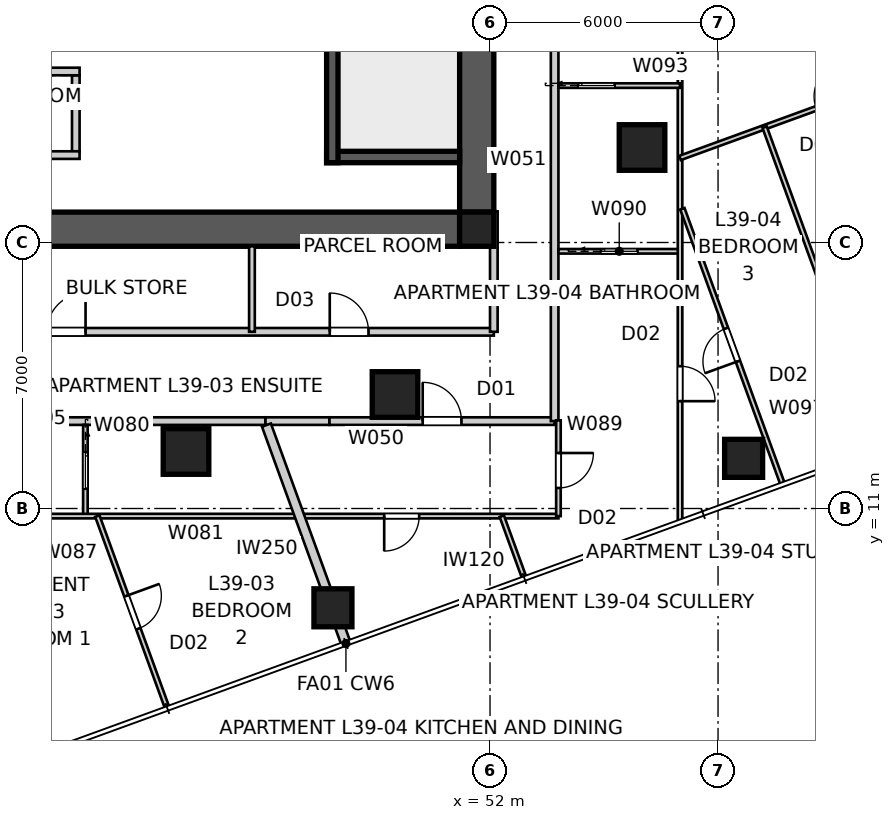
"""IFC4 building model, lengths in metres.
Left out: names, types, materials, properties, quantities, classifications, styles, units other than length and angle.
Written with IfcOpenShell. Run it as: python <this file> out.ifc"""

import sys

from ifc_helpers import new_model, si_unit, direction, frame, frame_2d, origin, origin_2d, place, context, subcontext, project, spatial, polyline, rectangle, outline, extrude, element, fill, save


model = new_model("IFC4")
c1 = context("Model", 3, precision=1e-05, world=origin(), true_north=direction((0.0, 1.0)))
c2 = subcontext(c1, "Body", "Model", "MODEL_VIEW")
j1 = project(units=[si_unit("LENGTHUNIT", "METRE"), si_unit("PLANEANGLEUNIT", "RADIAN")], contexts=[c1])
p1 = place(None, origin())
s1 = spatial("IfcSite", under=j1, at=p1, CompositionType="ELEMENT")
p2 = place(p1, origin())
s2 = spatial("IfcBuilding", under=s1, at=p2, CompositionType="ELEMENT")
p3 = place(p2, frame((0.0, 0.0, 143.8)))
s3 = spatial("IfcBuildingStorey", under=s2, at=p3, CompositionType="ELEMENT", Elevation=143.8)
p4 = place(p3, frame((51.2, 18.35, 0.0), z_axis=(0.0, 0.0, 1.0), x_axis=(-1.0, 0.0, 0.0)))
e1 = element("IfcWall", 1, at=p4, inside=s3, PredefinedType="SHEAR", context=c2, shape_type="SweptSolid", body=[
    extrude(outline(polyline([(0.0, -0.45), (22.4, -0.45), (22.4, -0.025), (22.85, -0.025), (22.85, 0.025), (22.4, 0.025), (22.4, 0.45), (0.0, 0.45), (0.0, 0.025), (-0.45, 0.025), (-0.45, -0.025), (0.0, -0.025), (0.0, -0.45)])), origin(), (0.0, 0.0, 1.0), 3.4),
])
p5 = place(p3, frame((51.65, 18.8, 0.0), z_axis=(0.0, 0.0, 1.0), x_axis=(0.0, 1.0, 0.0)))
e2 = element("IfcWall", 2, at=p5, inside=s3, PredefinedType="SHEAR", context=c2, shape_type="SweptSolid", body=[
    extrude(outline(polyline([(0.0, -0.45), (22.4, -0.45), (22.4, -0.025), (22.85, -0.025), (22.85, 0.025), (22.4, 0.025), (22.4, 0.45), (0.0, 0.45), (0.0, 0.025), (-0.45, 0.025), (-0.45, -0.025), (0.0, -0.025), (0.0, -0.45)])), origin(), (0.0, 0.0, 1.0), 3.4),
])
p6 = place(p5, frame((11.14, 0.0, 0.0)))
e3 = element("IfcOpeningElement", 3, at=p6, cuts=e2, PredefinedType="OPENING", context=c2, shape_type="SweptSolid", body=[
    extrude(rectangle(XDim=1.02, YDim=2.4, at=frame_2d((0.51, 1.2))), frame((0.0, 0.46, 0.0), z_axis=(0.0, -1.0, 0.0), x_axis=(1.0, 0.0, 0.0)), (0.0, 0.0, 1.0), 0.92),
])
p7 = place(p3, frame((47.85, 27.8, 0.0), z_axis=(0.0, 0.0, 1.0), x_axis=(0.0, -1.0, 0.0)))
e4 = element("IfcWall", 4, at=p7, inside=s3, PredefinedType="SHEAR", context=c2, shape_type="SweptSolid", body=[
    extrude(rectangle(XDim=7.7, YDim=0.3, at=frame_2d((3.85, 0.0))), origin(), (0.0, 0.0, 1.0), 3.4),
])
p8 = place(p3, frame((51.2, 20.25, 0.0), z_axis=(0.0, 0.0, 1.0), x_axis=(-1.0, 0.0, 0.0)))
e5 = element("IfcWall", 5, at=p8, inside=s3, PredefinedType="SHEAR", context=c2, shape_type="SweptSolid", body=[
    extrude(rectangle(XDim=3.5, YDim=0.3, at=frame_2d((1.75, 0.0))), origin(), (0.0, 0.0, 1.0), 3.4),
])
p9 = place(p3, frame((41.1, 22.4, 0.0), z_axis=(0.0, 0.0, 1.0), x_axis=(0.0, -1.0, 0.0)))
e6 = element("IfcWall", 6, at=p9, inside=s3, PredefinedType="SOLIDWALL", context=c2, shape_type="SweptSolid", body=[
    extrude(rectangle(XDim=2.0, YDim=0.2, at=frame_2d((1.0, 0.0))), origin(), (0.0, 0.0, 1.0), 3.4),
])
for number, where, z_axis, x_axis in (
    (7, (38.8, 22.5, 0.0), (0.0, 0.0, 1.0), (1.0, 0.0, 0.0)),
    (8, (38.8, 20.3, 0.0), (0.0, 0.0, 1.0), (1.0, 0.0, 0.0)),
):
    element("IfcWall", number, at=place(p3, frame(where, z_axis=z_axis, x_axis=x_axis)), inside=s3, PredefinedType="SOLIDWALL", context=c2, shape_type="SweptSolid", body=[
        extrude(rectangle(XDim=2.4, YDim=0.2, at=frame_2d((1.2, 0.0))), origin(), (0.0, 0.0, 1.0), 3.4),
    ])
p10 = place(p3, frame((51.65, 18.35, 0.0), z_axis=(0.0, 0.0, 1.0), x_axis=(1.0, 0.0, 0.0)))
e9 = element("IfcColumn", 9, at=p10, inside=s3, PredefinedType="COLUMN", context=c2, shape_type="SweptSolid", body=[
    extrude(rectangle(XDim=0.9, YDim=0.9, at=origin_2d()), origin(), (0.0, 0.0, 1.0), 3.4),
])
for number, where, z_axis, x_axis in (
    (10, (47.866, 8.387, -0.15), (0.0, 0.0, 1.0), (1.0, 0.0, 0.0)),
    (11, (58.673, 12.32, -0.15), (0.0, 0.0, 1.0), (1.0, 0.0, 0.0)),
):
    element("IfcColumn", number, at=place(p3, frame(where, z_axis=z_axis, x_axis=x_axis)), inside=s3, PredefinedType="COLUMN", context=c2, shape_type="SweptSolid", body=[
        extrude(rectangle(XDim=1.0, YDim=1.0, at=origin_2d()), origin(), (0.0, 0.0, 1.0), 3.55),
    ])
for number, where, z_axis, x_axis in (
    (12, (44.0, 12.5, 0.0), (0.0, 0.0, 1.0), (1.0, 0.0, 0.0)),
    (13, (49.5, 14.0, 0.0), (0.0, 0.0, 1.0), (1.0, 0.0, 0.0)),
    (14, (56.0, 20.5, 0.0), (0.0, 0.0, 1.0), (1.0, 0.0, 0.0)),
):
    element("IfcColumn", number, at=place(p3, frame(where, z_axis=z_axis, x_axis=x_axis)), inside=s3, PredefinedType="COLUMN", context=c2, shape_type="SweptSolid", body=[
        extrude(rectangle(XDim=1.2, YDim=1.2, at=origin_2d()), origin(), (0.0, 0.0, 1.0), 3.4),
    ])
p11 = place(p3, frame((33.908, 13.3, 0.0), z_axis=(0.0, 0.0, 1.0), x_axis=(1.0, 0.0, 0.0)))
e15 = element("IfcWall", 15, at=p11, inside=s3, PredefinedType="PARTITIONING", context=c2, shape_type="SweptSolid", body=[
    extrude(rectangle(XDim=12.183, YDim=0.2, at=frame_2d((6.092, 0.0))), origin(), (0.0, 0.0, 1.0), 3.25),
])
p12 = place(p3, frame((46.092, 13.3, 0.0), z_axis=(0.0, 0.0, 1.0), x_axis=(1.0, 0.0, 0.0)))
e16 = element("IfcWall", 16, at=p12, inside=s3, PredefinedType="PARTITIONING", context=c2, shape_type="SweptSolid", body=[
    extrude(rectangle(XDim=1.684, YDim=0.2, at=frame_2d((0.842, 0.0))), origin(), (0.0, 0.0, 1.0), 2.55),
])
p13 = place(p3, frame((47.775, 13.3, 0.0), z_axis=(0.0, 0.0, 1.0), x_axis=(1.0, 0.0, 0.0)))
e17 = element("IfcWall", 17, at=p13, inside=s3, PredefinedType="PARTITIONING", context=c2, shape_type="SweptSolid", body=[
    extrude(rectangle(XDim=5.925, YDim=0.2, at=frame_2d((2.962, 0.0))), origin(), (0.0, 0.0, 1.0), 3.25),
])
p14 = place(p13, frame((2.453, 0.0, 0.0)))
e18 = element("IfcOpeningElement", 18, at=p14, cuts=e17, PredefinedType="OPENING", context=c2, shape_type="SweptSolid", body=[
    extrude(rectangle(XDim=1.02, YDim=2.34, at=frame_2d((0.51, 1.17))), frame((0.0, 0.11, 0.0), z_axis=(0.0, -1.0, 0.0), x_axis=(1.0, 0.0, 0.0)), (0.0, 0.0, 1.0), 0.22),
])
p15 = place(p3, frame((53.7, 13.3, 0.0), z_axis=(0.0, 0.0, 1.0), x_axis=(0.0, 1.0, 0.0)))
e19 = element("IfcWall", 19, at=p15, inside=s3, PredefinedType="PARTITIONING", context=c2, shape_type="SweptSolid", body=[
    extrude(rectangle(XDim=33.0, YDim=0.2, at=frame_2d((16.5, 0.0))), origin(), (0.0, 0.0, 1.0), 3.25),
])
p16 = place(p15, frame((28.411, 0.0, 0.0)))
e20 = element("IfcOpeningElement", 20, at=p16, cuts=e19, PredefinedType="OPENING", context=c2, shape_type="SweptSolid", body=[
    extrude(rectangle(XDim=1.02, YDim=2.1, at=frame_2d((0.51, 1.05))), frame((0.0, 0.11, 0.0), z_axis=(0.0, -1.0, 0.0), x_axis=(1.0, 0.0, 0.0)), (0.0, 0.0, 1.0), 0.22),
])
p17 = place(p15, frame((13.741, 0.0, 0.0)))
e21 = element("IfcOpeningElement", 21, at=p17, cuts=e19, PredefinedType="OPENING", context=c2, shape_type="SweptSolid", body=[
    extrude(rectangle(XDim=1.02, YDim=2.34, at=frame_2d((0.51, 1.17))), frame((0.0, 0.11, 0.0), z_axis=(0.0, -1.0, 0.0), x_axis=(1.0, 0.0, 0.0)), (0.0, 0.0, 1.0), 0.22),
])
p18 = place(p3, frame((48.208, 7.447, 0.0), z_axis=(0.0, 0.0, 1.0), x_axis=(-0.341999444481, 0.939700154291, 0.0)))
e22 = element("IfcWall", 22, at=p18, inside=s3, PredefinedType="PARTITIONING", context=c2, shape_type="SweptSolid", body=[
    extrude(rectangle(XDim=6.116, YDim=0.25, at=frame_2d((3.058, 0.0))), origin(), (0.0, 0.0, 1.0), 3.25),
])
p19 = place(p3, frame((27.9, 15.65, 0.0), z_axis=(0.0, 0.0, 1.0), x_axis=(1.0, 0.0, 0.0)))
e23 = element("IfcWall", 23, at=p19, inside=s3, PredefinedType="PARTITIONING", context=c2, shape_type="SweptSolid", body=[
    extrude(rectangle(XDim=24.2, YDim=0.2, at=frame_2d((12.1, 0.0))), origin(), (0.0, 0.0, 1.0), 3.25),
])
p20 = place(p19, frame((12.437, 0.0, 0.0)))
e24 = element("IfcOpeningElement", 24, at=p20, cuts=e23, PredefinedType="OPENING", context=c2, shape_type="SweptSolid", body=[
    extrude(rectangle(XDim=1.02, YDim=2.1, at=frame_2d((0.51, 1.05))), frame((0.0, 0.11, 0.0), z_axis=(0.0, -1.0, 0.0), x_axis=(1.0, 0.0, 0.0)), (0.0, 0.0, 1.0), 0.22),
])
p21 = place(p19, frame((3.544, 0.0, 0.0)))
e25 = element("IfcOpeningElement", 25, at=p21, cuts=e23, PredefinedType="OPENING", context=c2, shape_type="SweptSolid", body=[
    extrude(rectangle(XDim=1.02, YDim=2.1, at=frame_2d((0.51, 1.05))), frame((0.0, 0.11, 0.0), z_axis=(0.0, -1.0, 0.0), x_axis=(1.0, 0.0, 0.0)), (0.0, 0.0, 1.0), 0.22),
])
p22 = place(p19, frame((19.883, 0.0, 0.0)))
e26 = element("IfcOpeningElement", 26, at=p22, cuts=e23, PredefinedType="OPENING", context=c2, shape_type="SweptSolid", body=[
    extrude(rectangle(XDim=1.02, YDim=2.1, at=frame_2d((0.51, 1.05))), frame((0.0, 0.11, 0.0), z_axis=(0.0, -1.0, 0.0), x_axis=(1.0, 0.0, 0.0)), (0.0, 0.0, 1.0), 0.22),
])
p23 = place(p3, frame((52.1, 15.65, 0.0), z_axis=(0.0, 0.0, 1.0), x_axis=(0.0, 1.0, 0.0)))
e27 = element("IfcWall", 27, at=p23, inside=s3, PredefinedType="PARTITIONING", context=c2, shape_type="SweptSolid", body=[
    extrude(rectangle(XDim=3.17, YDim=0.2, at=frame_2d((1.585, 0.0))), origin(), (0.0, 0.0, 1.0), 3.25),
])
p24 = place(p3, frame((45.735, 15.65, 0.0), z_axis=(0.0, 0.0, 1.0), x_axis=(0.0, 1.0, 0.0)))
e28 = element("IfcWall", 28, at=p24, inside=s3, PredefinedType="SOLIDWALL", context=c2, shape_type="SweptSolid", body=[
    extrude(rectangle(XDim=2.25, YDim=0.15, at=frame_2d((1.125, 0.0))), origin(), (0.0, 0.0, 1.0), 2.796),
])
p25 = place(p3, frame((41.353, 13.2, 0.0), z_axis=(0.0, 0.0, 1.0), x_axis=(0.0, -1.0, 0.0)))
e29 = element("IfcWall", 29, at=p25, inside=s3, PredefinedType="PARTITIONING", context=c2, shape_type="SweptSolid", body=[
    extrude(rectangle(XDim=2.4, YDim=0.12, at=frame_2d((1.2, 0.0))), origin(), (0.0, 0.0, 1.0), 3.25),
])
p26 = place(p25, frame((0.72, 0.0, 0.0)))
e30 = element("IfcOpeningElement", 30, at=p26, cuts=e29, PredefinedType="OPENING", context=c2, shape_type="SweptSolid", body=[
    extrude(rectangle(XDim=0.96, YDim=2.1, at=frame_2d((0.48, 1.05))), frame((0.0, 0.07, 0.0), z_axis=(0.0, -1.0, 0.0), x_axis=(1.0, 0.0, 0.0)), (0.0, 0.0, 1.0), 0.14),
])
p27 = place(p3, frame((53.8, 10.8, 0.0), z_axis=(0.0, 0.0, 1.0), x_axis=(-1.0, 0.0, 0.0)))
e31 = element("IfcWall", 31, at=p27, inside=s3, PredefinedType="PARTITIONING", context=c2, shape_type="SweptSolid", body=[
    extrude(rectangle(XDim=17.884, YDim=0.12, at=frame_2d((8.942, 0.0))), origin(), (0.0, 0.0, 1.0), 3.25),
])
p28 = place(p27, frame((3.665, 0.0, 0.0)))
e32 = element("IfcOpeningElement", 32, at=p28, cuts=e31, PredefinedType="OPENING", context=c2, shape_type="SweptSolid", body=[
    extrude(rectangle(XDim=0.92, YDim=2.34, at=frame_2d((0.46, 1.17))), frame((0.0, 0.07, 0.0), z_axis=(0.0, -1.0, 0.0), x_axis=(1.0, 0.0, 0.0)), (0.0, 0.0, 1.0), 0.14),
])
p29 = place(p27, frame((14.497, 0.0, 0.0)))
e33 = element("IfcOpeningElement", 33, at=p29, cuts=e31, PredefinedType="OPENING", context=c2, shape_type="SweptSolid", body=[
    extrude(rectangle(XDim=0.96, YDim=2.1, at=frame_2d((0.48, 1.05))), frame((0.0, 0.07, 0.0), z_axis=(0.0, -1.0, 0.0), x_axis=(1.0, 0.0, 0.0)), (0.0, 0.0, 1.0), 0.14),
])
p30 = place(p3, frame((41.667, 10.8, 0.0), z_axis=(0.0, 0.0, 1.0), x_axis=(0.341995981916, -0.939701414468, 0.0)))
e34 = element("IfcWall", 34, at=p30, inside=s3, PredefinedType="PARTITIONING", context=c2, shape_type="SweptSolid", body=[
    extrude(rectangle(XDim=5.348, YDim=0.12, at=frame_2d((2.674, 0.0))), origin(), (0.0, 0.0, 1.0), 3.25),
])
p31 = place(p30, frame((2.234, 0.0, 0.0)))
e35 = element("IfcOpeningElement", 35, at=p31, cuts=e34, PredefinedType="OPENING", context=c2, shape_type="SweptSolid", body=[
    extrude(rectangle(XDim=0.92, YDim=2.34, at=frame_2d((0.46, 1.17))), frame((0.0, 0.07, 0.0), z_axis=(0.0, -1.0, 0.0), x_axis=(1.0, 0.0, 0.0)), (0.0, 0.0, 1.0), 0.14),
])
p32 = place(p3, frame((53.8, 13.32, 0.0), z_axis=(0.0, 0.0, 1.0), x_axis=(0.0, -1.0, 0.0)))
e36 = element("IfcWall", 36, at=p32, inside=s3, PredefinedType="PARTITIONING", context=c2, shape_type="SweptSolid", body=[
    extrude(rectangle(XDim=2.52, YDim=0.12, at=frame_2d((1.26, 0.0))), origin(), (0.0, 0.0, 1.0), 3.25),
])
p33 = place(p32, frame((0.86, 0.0, 0.0)))
e37 = element("IfcOpeningElement", 37, at=p33, cuts=e36, PredefinedType="OPENING", context=c2, shape_type="SweptSolid", body=[
    extrude(rectangle(XDim=0.92, YDim=2.34, at=frame_2d((0.46, 1.17))), frame((0.0, 0.07, 0.0), z_axis=(0.0, -1.0, 0.0), x_axis=(1.0, 0.0, 0.0)), (0.0, 0.0, 1.0), 0.14),
])
p34 = place(p3, frame((53.8, 17.769, 0.0), z_axis=(0.0, 0.0, 1.0), x_axis=(1.0, 0.0, 0.0)))
e38 = element("IfcWall", 38, at=p34, inside=s3, PredefinedType="PARTITIONING", context=c2, shape_type="SweptSolid", body=[
    extrude(rectangle(XDim=3.2, YDim=0.12, at=frame_2d((1.6, 0.0))), origin(), (0.0, 0.0, 1.0), 3.25),
])
p35 = place(p34, frame((1.12, 0.0, 0.0)))
e39 = element("IfcOpeningElement", 39, at=p35, cuts=e38, PredefinedType="OPENING", context=c2, shape_type="SweptSolid", body=[
    extrude(rectangle(XDim=0.96, YDim=2.1, at=frame_2d((0.48, 1.05))), frame((0.0, 0.07, 0.0), z_axis=(0.0, -1.0, 0.0), x_axis=(1.0, 0.0, 0.0)), (0.0, 0.0, 1.0), 0.14),
])
p36 = place(p3, frame((57.0, 48.8, 0.0), z_axis=(0.0, 0.0, 1.0), x_axis=(0.0, -1.0, 0.0)))
e40 = element("IfcWall", 40, at=p36, inside=s3, PredefinedType="PARTITIONING", context=c2, shape_type="SweptSolid", body=[
    extrude(rectangle(XDim=38.113, YDim=0.12, at=frame_2d((19.056, 0.0))), origin(), (0.0, 0.0, 1.0), 2.55),
])
p37 = place(p36, frame((4.198, 0.0, 0.0)))
e41 = element("IfcOpeningElement", 41, at=p37, cuts=e40, PredefinedType="OPENING", context=c2, shape_type="SweptSolid", body=[
    extrude(rectangle(XDim=0.92, YDim=2.34, at=frame_2d((0.46, 1.17))), frame((0.0, 0.07, 0.0), z_axis=(0.0, -1.0, 0.0), x_axis=(1.0, 0.0, 0.0)), (0.0, 0.0, 1.0), 0.14),
])
p38 = place(p36, frame((7.692, 0.0, 0.0)))
e42 = element("IfcOpeningElement", 42, at=p38, cuts=e40, PredefinedType="OPENING", context=c2, shape_type="SweptSolid", body=[
    extrude(rectangle(XDim=0.92, YDim=2.34, at=frame_2d((0.46, 1.17))), frame((0.0, 0.07, 0.0), z_axis=(0.0, -1.0, 0.0), x_axis=(1.0, 0.0, 0.0)), (0.0, 0.0, 1.0), 0.14),
])
p39 = place(p36, frame((20.162, 0.0, 0.0)))
e43 = element("IfcOpeningElement", 43, at=p39, cuts=e40, PredefinedType="OPENING", context=c2, shape_type="SweptSolid", body=[
    extrude(rectangle(XDim=0.92, YDim=2.34, at=frame_2d((0.46, 1.17))), frame((0.0, 0.07, 0.0), z_axis=(0.0, -1.0, 0.0), x_axis=(1.0, 0.0, 0.0)), (0.0, 0.0, 1.0), 0.14),
])
p40 = place(p36, frame((34.056, 0.0, 0.0)))
e44 = element("IfcOpeningElement", 44, at=p40, cuts=e40, PredefinedType="OPENING", context=c2, shape_type="SweptSolid", body=[
    extrude(rectangle(XDim=0.92, YDim=2.34, at=frame_2d((0.46, 1.17))), frame((0.0, 0.07, 0.0), z_axis=(0.0, -1.0, 0.0), x_axis=(1.0, 0.0, 0.0)), (0.0, 0.0, 1.0), 0.14),
])
p41 = place(p36, frame((24.482, 0.0, 0.0)))
e45 = element("IfcOpeningElement", 45, at=p41, cuts=e40, PredefinedType="OPENING", context=c2, shape_type="SweptSolid", body=[
    extrude(rectangle(XDim=0.96, YDim=2.1, at=frame_2d((0.48, 1.05))), frame((0.0, 0.07, 0.0), z_axis=(0.0, -1.0, 0.0), x_axis=(1.0, 0.0, 0.0)), (0.0, 0.0, 1.0), 0.14),
])
p42 = place(p3, frame((52.893, 9.195, 0.0), z_axis=(0.0, 0.0, 1.0), x_axis=(-0.342052919471, 0.939680690597, 0.0)))
e46 = element("IfcWall", 46, at=p42, inside=s3, PredefinedType="PARTITIONING", context=c2, shape_type="SweptSolid", body=[
    extrude(rectangle(XDim=1.708, YDim=0.12, at=frame_2d((0.854, 0.0))), origin(), (0.0, 0.0, 1.0), 3.25),
])
p43 = place(p3, frame((53.8, 22.129, 0.0), z_axis=(0.0, 0.0, 1.0), x_axis=(1.0, 0.0, 0.0)))
e47 = element("IfcWall", 47, at=p43, inside=s3, PredefinedType="PARTITIONING", context=c2, shape_type="SweptSolid", body=[
    extrude(rectangle(XDim=3.2, YDim=0.12, at=frame_2d((1.6, 0.0))), origin(), (0.0, 0.0, 1.0), 3.25),
])
p44 = place(p43, frame((0.52, 0.0, 0.0)))
e48 = element("IfcOpeningElement", 48, at=p44, cuts=e47, PredefinedType="OPENING", context=c2, shape_type="SweptSolid", body=[
    extrude(rectangle(XDim=0.96, YDim=2.1, at=frame_2d((0.48, 1.05))), frame((0.0, 0.07, 0.0), z_axis=(0.0, -1.0, 0.0), x_axis=(1.0, 0.0, 0.0)), (0.0, 0.0, 1.0), 0.14),
])
p45 = place(p3, frame((57.0, 20.225, 0.0), z_axis=(0.0, 0.0, 1.0), x_axis=(0.939693965364, 0.342016449105, 0.0)))
e49 = element("IfcWall", 49, at=p45, inside=s3, PredefinedType="PARTITIONING", context=c2, shape_type="SweptSolid", body=[
    extrude(rectangle(XDim=11.328, YDim=0.12, at=frame_2d((5.664, 0.0))), origin(), (0.0, 0.0, 1.0), 3.25),
])
p46 = place(p45, frame((3.812, 0.0, 0.0)))
e50 = element("IfcOpeningElement", 50, at=p46, cuts=e49, PredefinedType="OPENING", context=c2, shape_type="SweptSolid", body=[
    extrude(rectangle(XDim=0.92, YDim=2.34, at=frame_2d((0.46, 1.17))), frame((0.0, 0.07, 0.0), z_axis=(0.0, -1.0, 0.0), x_axis=(1.0, 0.0, 0.0)), (0.0, 0.0, 1.0), 0.14),
])
p47 = place(p3, frame((62.29, 12.615, 0.0), z_axis=(0.0, 0.0, 1.0), x_axis=(-0.342038393654, 0.939685978009, 0.0)))
e51 = element("IfcWall", 51, at=p47, inside=s3, PredefinedType="PARTITIONING", context=c2, shape_type="SweptSolid", body=[
    extrude(rectangle(XDim=8.96, YDim=0.12, at=frame_2d((4.48, 0.0))), origin(), (0.0, 0.0, 1.0), 3.25),
])
p48 = place(p3, frame((59.689, 11.669, 0.0), z_axis=(0.0, 0.0, 1.0), x_axis=(-0.342003311293, 0.939698746974, 0.0)))
e52 = element("IfcWall", 52, at=p48, inside=s3, PredefinedType="PARTITIONING", context=c2, shape_type="SweptSolid", body=[
    extrude(rectangle(XDim=7.683, YDim=0.12, at=frame_2d((3.841, 0.0))), origin(), (0.0, 0.0, 1.0), 3.25),
])
p49 = place(p48, frame((3.411, 0.0, 0.0)))
e53 = element("IfcOpeningElement", 53, at=p49, cuts=e52, PredefinedType="OPENING", context=c2, shape_type="SweptSolid", body=[
    extrude(rectangle(XDim=0.92, YDim=2.34, at=frame_2d((0.46, 1.17))), frame((0.0, 0.07, 0.0), z_axis=(0.0, -1.0, 0.0), x_axis=(1.0, 0.0, 0.0)), (0.0, 0.0, 1.0), 0.14),
])
p50 = place(p20, origin())
e54 = element("IfcDoor", 54, at=p50, inside=s3, OperationType="SINGLE_SWING_RIGHT", PredefinedType="DOOR", context=c2, shape_type="SweptSolid", body=[
    extrude(rectangle(XDim=1.02, YDim=2.1, at=frame_2d((0.51, 1.05))), frame((0.0, 0.025, 0.0), z_axis=(0.0, -1.0, 0.0), x_axis=(1.0, 0.0, 0.0)), (0.0, 0.0, 1.0), 0.05),
])
fill(e24, e54)
p51 = place(p14, origin())
e55 = element("IfcDoor", 55, at=p51, inside=s3, OperationType="SINGLE_SWING_LEFT", PredefinedType="DOOR", context=c2, shape_type="SweptSolid", body=[
    extrude(rectangle(XDim=1.02, YDim=2.34, at=frame_2d((0.51, 1.17))), frame((0.0, 0.025, 0.0), z_axis=(0.0, -1.0, 0.0), x_axis=(1.0, 0.0, 0.0)), (0.0, 0.0, 1.0), 0.05),
])
fill(e18, e55)
p52 = place(p22, origin())
e56 = element("IfcDoor", 56, at=p52, inside=s3, OperationType="SINGLE_SWING_LEFT", PredefinedType="DOOR", context=c2, shape_type="SweptSolid", body=[
    extrude(rectangle(XDim=1.02, YDim=2.1, at=frame_2d((0.51, 1.05))), frame((0.0, 0.025, 0.0), z_axis=(0.0, -1.0, 0.0), x_axis=(1.0, 0.0, 0.0)), (0.0, 0.0, 1.0), 0.05),
])
fill(e26, e56)
p53 = place(p28, origin())
e57 = element("IfcDoor", 57, at=p53, inside=s3, OperationType="SINGLE_SWING_RIGHT", PredefinedType="DOOR", context=c2, shape_type="SweptSolid", body=[
    extrude(rectangle(XDim=0.92, YDim=2.34, at=frame_2d((0.46, 1.17))), frame((0.0, 0.025, 0.0), z_axis=(0.0, -1.0, 0.0), x_axis=(1.0, 0.0, 0.0)), (0.0, 0.0, 1.0), 0.05),
])
fill(e32, e57)
p54 = place(p33, origin())
e58 = element("IfcDoor", 58, at=p54, inside=s3, OperationType="SINGLE_SWING_LEFT", PredefinedType="DOOR", context=c2, shape_type="SweptSolid", body=[
    extrude(rectangle(XDim=0.92, YDim=2.34, at=frame_2d((0.46, 1.17))), frame((0.0, 0.025, 0.0), z_axis=(0.0, -1.0, 0.0), x_axis=(1.0, 0.0, 0.0)), (0.0, 0.0, 1.0), 0.05),
])
fill(e37, e58)
p55 = place(p40, origin())
e59 = element("IfcDoor", 59, at=p55, inside=s3, OperationType="SINGLE_SWING_RIGHT", PredefinedType="DOOR", context=c2, shape_type="SweptSolid", body=[
    extrude(rectangle(XDim=0.92, YDim=2.34, at=frame_2d((0.46, 1.17))), frame((0.0, 0.025, 0.0), z_axis=(0.0, -1.0, 0.0), x_axis=(1.0, 0.0, 0.0)), (0.0, 0.0, 1.0), 0.05),
])
fill(e44, e59)
p56 = place(p35, origin())
e60 = element("IfcDoor", 60, at=p56, inside=s3, OperationType="SLIDING_TO_LEFT", PredefinedType="DOOR", context=c2, shape_type="SweptSolid", body=[
    extrude(rectangle(XDim=0.96, YDim=2.1, at=frame_2d((0.48, 1.05))), frame((0.0, 0.025, 0.0), z_axis=(0.0, -1.0, 0.0), x_axis=(1.0, 0.0, 0.0)), (0.0, 0.0, 1.0), 0.05),
])
fill(e39, e60)
p57 = place(p49, origin())
e61 = element("IfcDoor", 61, at=p57, inside=s3, OperationType="SINGLE_SWING_LEFT", PredefinedType="DOOR", context=c2, shape_type="SweptSolid", body=[
    extrude(rectangle(XDim=0.92, YDim=2.34, at=frame_2d((0.46, 1.17))), frame((0.0, 0.025, 0.0), z_axis=(0.0, -1.0, 0.0), x_axis=(1.0, 0.0, 0.0)), (0.0, 0.0, 1.0), 0.05),
])
fill(e53, e61)
p58 = place(p44, origin())
e62 = element("IfcDoor", 62, at=p58, inside=s3, OperationType="SLIDING_TO_LEFT", PredefinedType="DOOR", context=c2, shape_type="SweptSolid", body=[
    extrude(rectangle(XDim=0.96, YDim=2.1, at=frame_2d((0.48, 1.05))), frame((0.0, 0.025, 0.0), z_axis=(0.0, -1.0, 0.0), x_axis=(1.0, 0.0, 0.0)), (0.0, 0.0, 1.0), 0.05),
])
fill(e48, e62)
p59 = place(p31, origin())
e63 = element("IfcDoor", 63, at=p59, inside=s3, OperationType="SINGLE_SWING_LEFT", PredefinedType="DOOR", context=c2, shape_type="SweptSolid", body=[
    extrude(rectangle(XDim=0.92, YDim=2.34, at=frame_2d((0.46, 1.17))), frame((0.0, 0.025, 0.0), z_axis=(0.0, -1.0, 0.0), x_axis=(1.0, 0.0, 0.0)), (0.0, 0.0, 1.0), 0.05),
])
fill(e35, e63)
p60 = place(p26, origin())
e64 = element("IfcDoor", 64, at=p60, inside=s3, OperationType="SLIDING_TO_LEFT", PredefinedType="DOOR", context=c2, shape_type="SweptSolid", body=[
    extrude(rectangle(XDim=0.96, YDim=2.1, at=frame_2d((0.48, 1.05))), frame((0.0, 0.025, 0.0), z_axis=(0.0, -1.0, 0.0), x_axis=(1.0, 0.0, 0.0)), (0.0, 0.0, 1.0), 0.05),
])
fill(e30, e64)
save(model, sys.argv[1])
